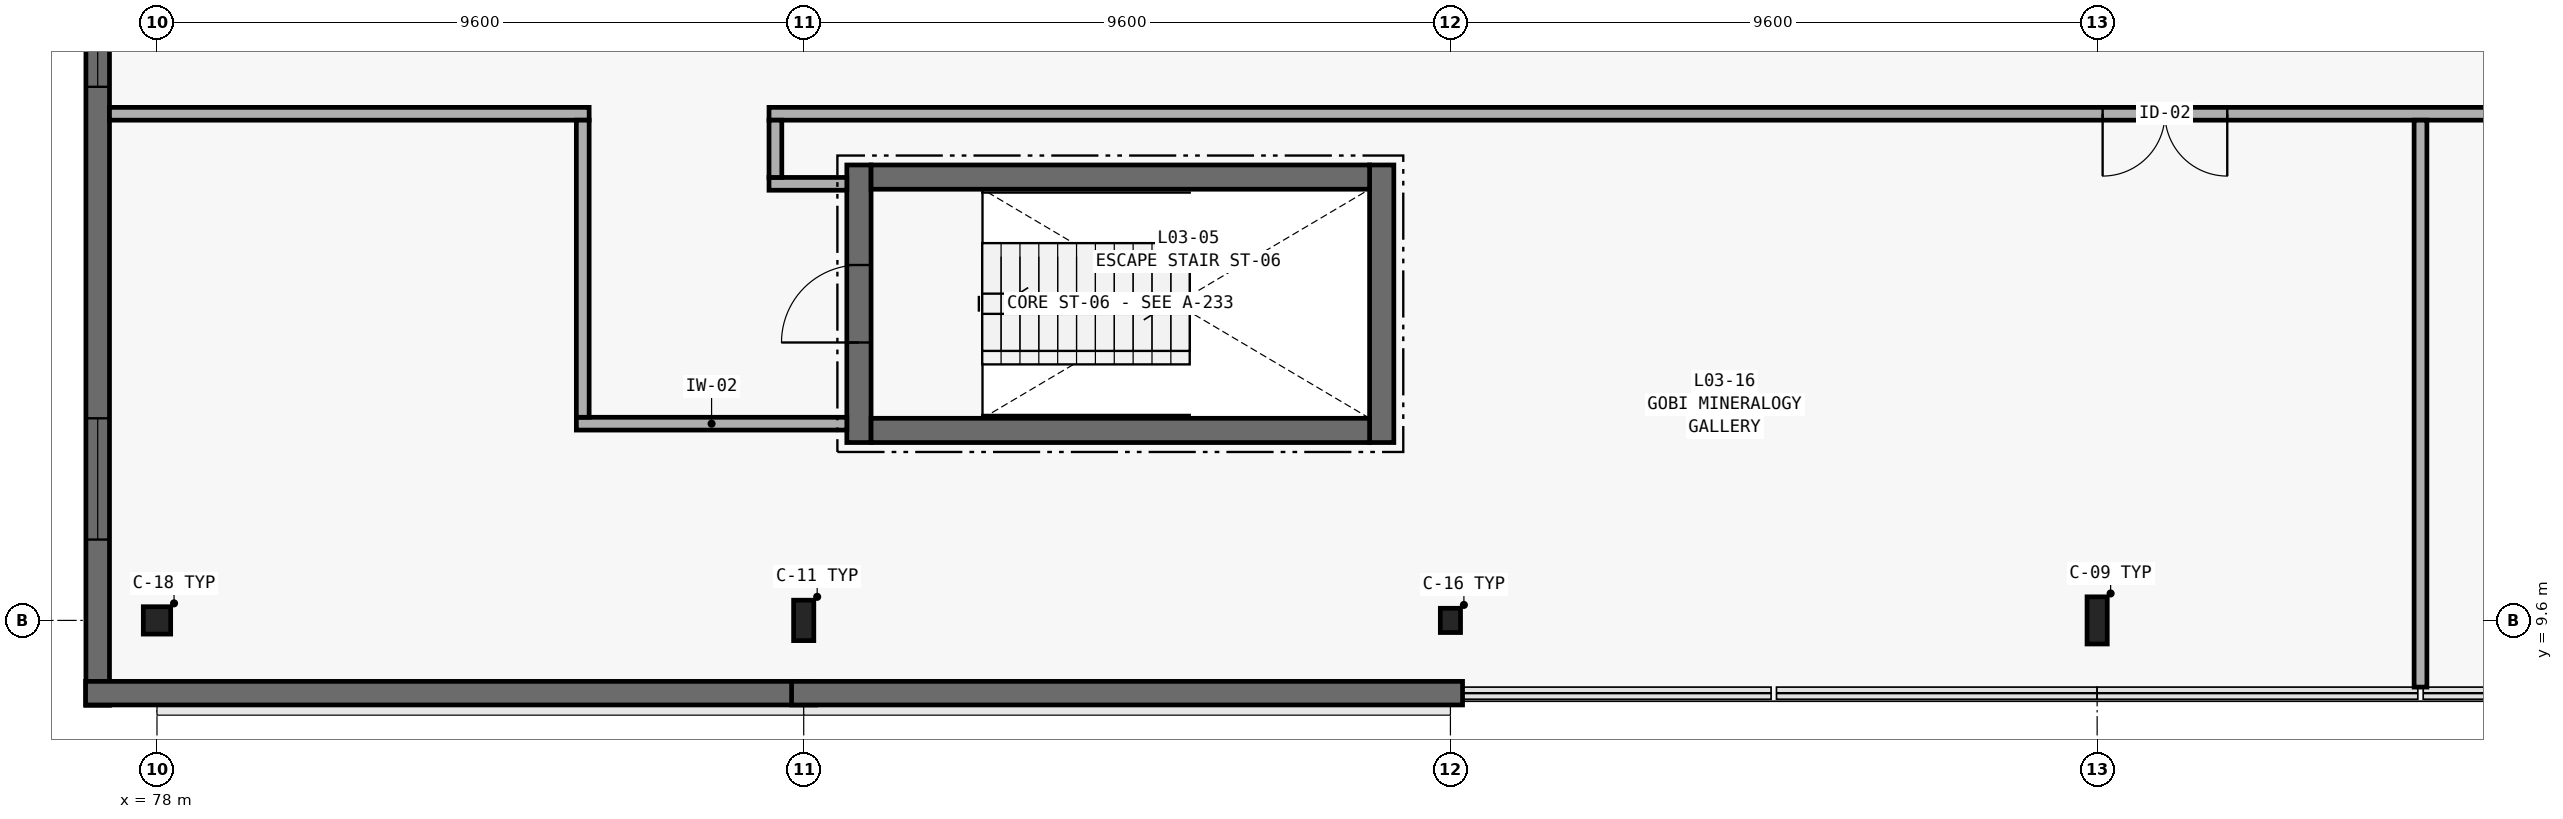
"""IFC4 building model, lengths in metres.
Left out: names, types, materials, properties, quantities, classifications, styles, units other than length and angle.
Written with IfcOpenShell. Run it as: python <this file> out.ifc"""

import sys

from ifc_helpers import new_model, si_unit, direction, frame, frame_2d, origin, origin_2d, place, context, subcontext, project, spatial, rectangle, hollow_circle, i_section, extrude, element, fill, save


model = new_model("IFC4")
c1 = context("Model", 3, precision=1e-05, world=origin(), true_north=direction((0.0, 1.0)))
c2 = subcontext(c1, "Body", "Model", "MODEL_VIEW")
j1 = project(units=[si_unit("LENGTHUNIT", "METRE"), si_unit("PLANEANGLEUNIT", "RADIAN")], contexts=[c1])
p1 = place(None, origin())
s1 = spatial("IfcSite", under=j1, at=p1, CompositionType="ELEMENT")
p2 = place(p1, origin())
s2 = spatial("IfcBuilding", under=s1, at=p2, CompositionType="ELEMENT")
p3 = place(p2, frame((0.0, 0.0, 17.1)))
s3 = spatial("IfcBuildingStorey", under=s2, at=p3, CompositionType="ELEMENT", Elevation=17.1)
p4 = place(p3, frame((78.0, 9.6, 0.0), z_axis=(0.0, 0.0, 1.0), x_axis=(1.0, 0.0, 0.0)))
e1 = element("IfcColumn", 1, at=p4, inside=s3, PredefinedType="COLUMN", context=c2, shape_type="SweptSolid", body=[
    extrude(hollow_circle(Radius=0.203, WallThickness=0.02, at=origin_2d()), origin(), (0.0, 0.0, 1.0), 4.2),
])
p5 = place(p3, frame((87.6, 9.6, 0.0), z_axis=(0.0, 0.0, 1.0), x_axis=(1.0, 0.0, 0.0)))
e2 = element("IfcColumn", 2, at=p5, inside=s3, PredefinedType="COLUMN", context=c2, shape_type="SweptSolid", body=[
    extrude(i_section(OverallWidth=0.3, OverallDepth=0.6, WebThickness=0.015, FlangeThickness=0.03, FilletRadius=0.027, at=origin_2d()), origin(), (0.0, 0.0, 1.0), 4.2),
])
p6 = place(p3, frame((97.2, 9.6, 0.0), z_axis=(0.0, 0.0, 1.0), x_axis=(1.0, 0.0, 0.0)))
e3 = element("IfcColumn", 3, at=p6, inside=s3, PredefinedType="COLUMN", context=c2, shape_type="SweptSolid", body=[
    extrude(i_section(OverallWidth=0.3, OverallDepth=0.36, WebThickness=0.012, FlangeThickness=0.022, FilletRadius=0.027, at=origin_2d()), origin(), (0.0, 0.0, 1.0), 4.2),
])
p7 = place(p3, frame((106.8, 9.6, 0.0), z_axis=(0.0, 0.0, 1.0), x_axis=(1.0, 0.0, 0.0)))
e4 = element("IfcColumn", 4, at=p7, inside=s3, PredefinedType="COLUMN", context=c2, shape_type="SweptSolid", body=[
    extrude(i_section(OverallWidth=0.3, OverallDepth=0.7, WebThickness=0.017, FlangeThickness=0.032, FilletRadius=0.027, at=origin_2d()), origin(), (0.0, 0.0, 1.0), 4.2),
])
p8 = place(p3, frame((77.12, 21.78, 0.0), z_axis=(0.0, 0.0, 1.0), x_axis=(0.0, -1.0, 0.0)))
e5 = element("IfcWall", 5, at=p8, inside=s3, PredefinedType="STANDARD", context=c2, shape_type="SweptSolid", body=[
    extrude(rectangle(XDim=13.44, YDim=0.35, at=frame_2d((6.72, 0.0))), origin(), (0.0, 0.0, 1.0), 3.9),
])
p9 = place(p8, frame((2.46, 0.0, 1.8)))
e6 = element("IfcOpeningElement", 6, at=p9, cuts=e5, PredefinedType="OPENING", context=c2, shape_type="SweptSolid", body=[
    extrude(rectangle(XDim=1.8, YDim=1.1, at=frame_2d((0.9, 0.55))), frame((0.0, 0.19, 0.0), z_axis=(0.0, -1.0, 0.0), x_axis=(1.0, 0.0, 0.0)), (0.0, 0.0, 1.0), 0.38),
])
p10 = place(p8, frame((9.18, 0.0, 1.8)))
e7 = element("IfcOpeningElement", 7, at=p10, cuts=e5, PredefinedType="OPENING", context=c2, shape_type="SweptSolid", body=[
    extrude(rectangle(XDim=1.8, YDim=1.1, at=frame_2d((0.9, 0.55))), frame((0.0, 0.19, 0.0), z_axis=(0.0, -1.0, 0.0), x_axis=(1.0, 0.0, 0.0)), (0.0, 0.0, 1.0), 0.38),
])
p11 = place(p3, frame((76.94, 8.52, 0.0), z_axis=(0.0, 0.0, 1.0), x_axis=(1.0, 0.0, 0.0)))
e8 = element("IfcWall", 8, at=p11, inside=s3, PredefinedType="STANDARD", context=c2, shape_type="SweptSolid", body=[
    extrude(rectangle(XDim=10.84, YDim=0.35, at=frame_2d((5.42, 0.0))), origin(), (0.0, 0.0, 1.0), 3.9),
])
p12 = place(p3, frame((87.42, 8.52, 0.0), z_axis=(0.0, 0.0, 1.0), x_axis=(1.0, 0.0, 0.0)))
e9 = element("IfcWall", 9, at=p12, inside=s3, PredefinedType="STANDARD", context=c2, shape_type="SweptSolid", body=[
    extrude(rectangle(XDim=9.96, YDim=0.35, at=frame_2d((4.98, 0.0))), origin(), (0.0, 0.0, 1.0), 3.9),
])
p13 = place(p3, frame((88.42, 12.24, 0.0), z_axis=(0.0, 0.0, 1.0), x_axis=(0.0, 1.0, 0.0)))
e10 = element("IfcWall", 10, at=p13, inside=s3, PredefinedType="SHEAR", context=c2, shape_type="SweptSolid", body=[
    extrude(rectangle(XDim=4.12, YDim=0.36, at=frame_2d((2.06, 0.0))), origin(), (0.0, 0.0, 1.0), 3.94),
])
p14 = place(p13, frame((1.485, 0.0, 0.0)))
e11 = element("IfcOpeningElement", 11, at=p14, cuts=e10, PredefinedType="OPENING", context=c2, shape_type="SweptSolid", body=[
    extrude(rectangle(XDim=1.15, YDim=2.15, at=frame_2d((0.575, 1.075))), frame((0.0, 0.195, 0.0), z_axis=(0.0, -1.0, 0.0), x_axis=(1.0, 0.0, 0.0)), (0.0, 0.0, 1.0), 0.39),
])
p15 = place(p3, frame((96.18, 12.24, 0.0), z_axis=(0.0, 0.0, 1.0), x_axis=(0.0, 1.0, 0.0)))
e12 = element("IfcWall", 12, at=p15, inside=s3, PredefinedType="SHEAR", context=c2, shape_type="SweptSolid", body=[
    extrude(rectangle(XDim=4.12, YDim=0.36, at=frame_2d((2.06, 0.0))), origin(), (0.0, 0.0, 1.0), 3.94),
])
for number, where, z_axis, x_axis in (
    (13, (88.6, 16.18, 0.0), (0.0, 0.0, 1.0), (1.0, 0.0, 0.0)),
    (14, (88.6, 12.42, 0.0), (0.0, 0.0, 1.0), (1.0, 0.0, 0.0)),
):
    element("IfcWall", number, at=place(p3, frame(where, z_axis=z_axis, x_axis=x_axis)), inside=s3, PredefinedType="SHEAR", context=c2, shape_type="SweptSolid", body=[
        extrude(rectangle(XDim=7.4, YDim=0.36, at=frame_2d((3.7, 0.0))), origin(), (0.0, 0.0, 1.0), 3.94),
    ])
p16 = place(p3, frame((84.225, 12.52, 0.0), z_axis=(0.0, 0.0, 1.0), x_axis=(1.0, 0.0, 0.0)))
e15 = element("IfcWall", 15, at=p16, inside=s3, PredefinedType="PARTITIONING", context=c2, shape_type="SweptSolid", body=[
    extrude(rectangle(XDim=4.015, YDim=0.19, at=frame_2d((2.007, 0.0))), origin(), (0.0, 0.0, 1.0), 2.82),
])
p17 = place(p3, frame((87.085, 16.08, 0.0), z_axis=(0.0, 0.0, 1.0), x_axis=(1.0, 0.0, 0.0)))
e16 = element("IfcWall", 16, at=p17, inside=s3, PredefinedType="PARTITIONING", context=c2, shape_type="SweptSolid", body=[
    extrude(rectangle(XDim=1.155, YDim=0.19, at=frame_2d((0.578, 0.0))), origin(), (0.0, 0.0, 1.0), 2.82),
])
p18 = place(p3, frame((77.295, 17.12, 0.0), z_axis=(0.0, 0.0, 1.0), x_axis=(1.0, 0.0, 0.0)))
e17 = element("IfcWall", 17, at=p18, inside=s3, PredefinedType="PARTITIONING", context=c2, shape_type="SweptSolid", body=[
    extrude(rectangle(XDim=7.12, YDim=0.19, at=frame_2d((3.56, 0.0))), origin(), (0.0, 0.0, 1.0), 2.82),
])
p19 = place(p3, frame((87.085, 17.12, 0.0), z_axis=(0.0, 0.0, 1.0), x_axis=(1.0, 0.0, 0.0)))
e18 = element("IfcWall", 18, at=p19, inside=s3, PredefinedType="PARTITIONING", context=c2, shape_type="SweptSolid", body=[
    extrude(rectangle(XDim=54.53, YDim=0.19, at=frame_2d((27.265, 0.0))), origin(), (0.0, 0.0, 1.0), 2.82),
])
p20 = place(p19, frame((19.796, 0.0, 0.0)))
e19 = element("IfcOpeningElement", 19, at=p20, cuts=e18, PredefinedType="OPENING", context=c2, shape_type="SweptSolid", body=[
    extrude(rectangle(XDim=1.85, YDim=2.35, at=frame_2d((0.925, 1.175))), frame((0.0, 0.11, 0.0), z_axis=(0.0, -1.0, 0.0), x_axis=(1.0, 0.0, 0.0)), (0.0, 0.0, 1.0), 0.22),
])
p21 = place(p19, frame((26.34, 0.0, 0.0)))
e20 = element("IfcOpeningElement", 20, at=p21, cuts=e18, PredefinedType="OPENING", context=c2, shape_type="SweptSolid", body=[
    extrude(rectangle(XDim=1.85, YDim=2.35, at=frame_2d((0.925, 1.175))), frame((0.0, 0.11, 0.0), z_axis=(0.0, -1.0, 0.0), x_axis=(1.0, 0.0, 0.0)), (0.0, 0.0, 1.0), 0.22),
])
p22 = place(p3, frame((84.32, 12.615, 0.0), z_axis=(0.0, 0.0, 1.0), x_axis=(0.0, 1.0, 0.0)))
e21 = element("IfcWall", 21, at=p22, inside=s3, PredefinedType="PARTITIONING", context=c2, shape_type="SweptSolid", body=[
    extrude(rectangle(XDim=4.41, YDim=0.19, at=frame_2d((2.205, 0.0))), origin(), (0.0, 0.0, 1.0), 2.82),
])
p23 = place(p3, frame((87.18, 16.175, 0.0), z_axis=(0.0, 0.0, 1.0), x_axis=(0.0, 1.0, 0.0)))
e22 = element("IfcWall", 22, at=p23, inside=s3, PredefinedType="PARTITIONING", context=c2, shape_type="SweptSolid", body=[
    extrude(rectangle(XDim=0.85, YDim=0.19, at=frame_2d((0.425, 0.0))), origin(), (0.0, 0.0, 1.0), 2.82),
])
p24 = place(p3, frame((111.6, 8.61, 0.0), z_axis=(0.0, 0.0, 1.0), x_axis=(0.0, 1.0, 0.0)))
e23 = element("IfcWall", 23, at=p24, inside=s3, PredefinedType="PARTITIONING", context=c2, shape_type="SweptSolid", body=[
    extrude(rectangle(XDim=8.415, YDim=0.19, at=frame_2d((4.208, 0.0))), origin(), (0.0, 0.0, 1.0), 2.82),
])
p25 = place(p9, origin())
e24 = element("IfcWindow", 24, at=p25, inside=s3, PartitioningType="SINGLE_PANEL", PredefinedType="WINDOW", context=c2, shape_type="SweptSolid", body=[
    extrude(rectangle(XDim=1.8, YDim=1.1, at=frame_2d((0.9, 0.55))), frame((0.0, 0.03, 0.0), z_axis=(0.0, -1.0, 0.0), x_axis=(1.0, 0.0, 0.0)), (0.0, 0.0, 1.0), 0.06),
])
fill(e6, e24)
p26 = place(p10, origin())
e25 = element("IfcWindow", 25, at=p26, inside=s3, PartitioningType="SINGLE_PANEL", PredefinedType="WINDOW", context=c2, shape_type="SweptSolid", body=[
    extrude(rectangle(XDim=1.8, YDim=1.1, at=frame_2d((0.9, 0.55))), frame((0.0, 0.03, 0.0), z_axis=(0.0, -1.0, 0.0), x_axis=(1.0, 0.0, 0.0)), (0.0, 0.0, 1.0), 0.06),
])
fill(e7, e25)
p27 = place(p14, origin())
e26 = element("IfcDoor", 26, at=p27, inside=s3, OperationType="SINGLE_SWING_LEFT", PredefinedType="DOOR", context=c2, shape_type="SweptSolid", body=[
    extrude(rectangle(XDim=1.15, YDim=2.15, at=frame_2d((0.575, 1.075))), frame((0.0, 0.025, 0.0), z_axis=(0.0, -1.0, 0.0), x_axis=(1.0, 0.0, 0.0)), (0.0, 0.0, 1.0), 0.05),
])
fill(e11, e26)
p28 = place(p20, frame((1.85, 0.0, 0.0), z_axis=(0.0, 0.0, 1.0), x_axis=(-1.0, 0.0, 0.0)))
e27 = element("IfcDoor", 27, at=p28, inside=s3, OperationType="DOUBLE_DOOR_SINGLE_SWING", PredefinedType="DOOR", context=c2, shape_type="SweptSolid", body=[
    extrude(rectangle(XDim=1.85, YDim=2.35, at=frame_2d((0.925, 1.175))), frame((0.0, 0.025, 0.0), z_axis=(0.0, -1.0, 0.0), x_axis=(1.0, 0.0, 0.0)), (0.0, 0.0, 1.0), 0.05),
])
fill(e19, e27)
save(model, sys.argv[1])
